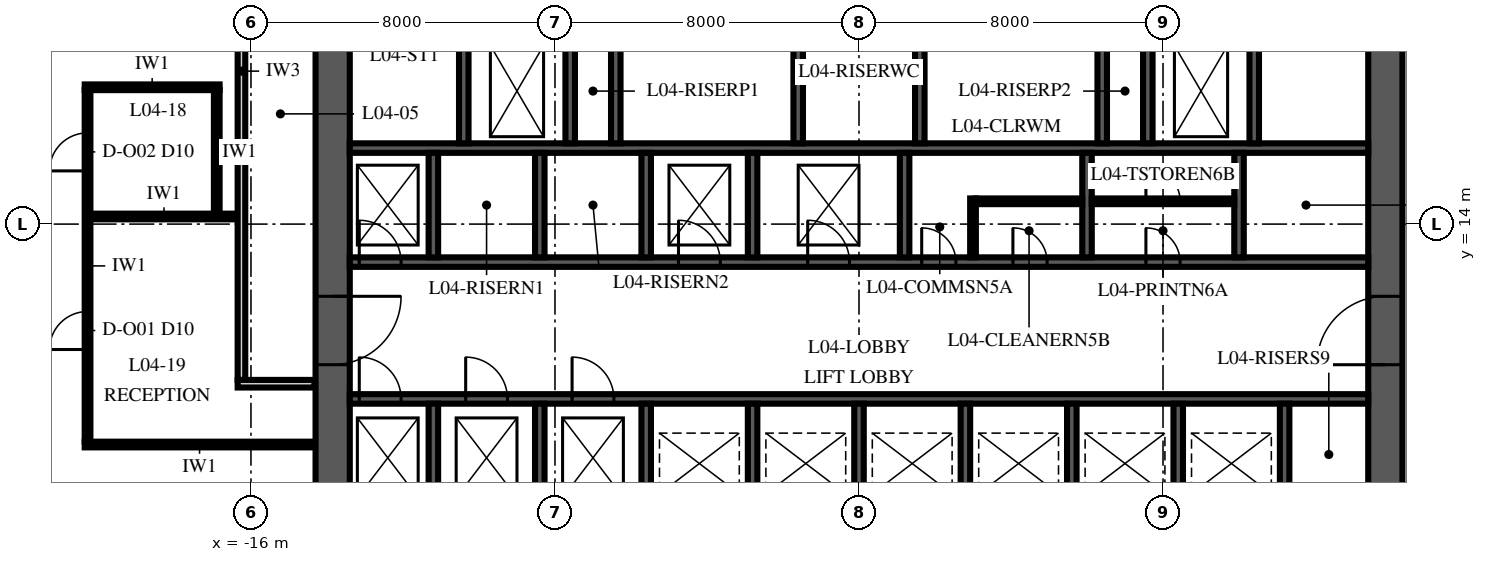
"""IFC4 building model, lengths in metres.
Left out: names, types, materials, properties, quantities, classifications, styles, units other than length and angle.
Written with IfcOpenShell. Run it as: python <this file> out.ifc"""

import sys

from ifc_helpers import new_model, si_unit, direction, frame, frame_2d, origin, place, context, subcontext, project, spatial, polyline, rectangle, outline, extrude, element, fill, save


model = new_model("IFC4")
c1 = context("Model", 3, precision=1e-05, world=origin(), true_north=direction((0.0, 1.0)))
c2 = subcontext(c1, "Body", "Model", "MODEL_VIEW")
j1 = project(units=[si_unit("LENGTHUNIT", "METRE"), si_unit("PLANEANGLEUNIT", "RADIAN")], contexts=[c1])
p1 = place(None, origin())
s1 = spatial("IfcSite", under=j1, at=p1, CompositionType="ELEMENT")
p2 = place(p1, origin())
s2 = spatial("IfcBuilding", under=s1, at=p2, CompositionType="ELEMENT")
p3 = place(p2, frame((0.0, 0.0, 28.0)))
s3 = spatial("IfcBuildingStorey", under=s2, at=p3, CompositionType="ELEMENT", Elevation=28.0)
p4 = place(p3, frame((13.85, 6.15, 0.0), z_axis=(0.0, 0.0, 1.0), x_axis=(0.0, 1.0, 0.0)))
e1 = element("IfcWall", 1, at=p4, inside=s3, PredefinedType="SHEAR", context=c2, shape_type="SweptSolid", body=[
    extrude(outline(polyline([(0.0, -0.45), (17.7, -0.45), (17.7, 0.0), (17.25, 0.0), (17.25, 0.45), (0.45, 0.45), (0.45, 0.0), (0.0, 0.0), (0.0, -0.45)])), origin(), (0.0, 0.0, 1.0), 4.0),
])
p5 = place(p4, frame((4.15, 0.0, 0.0)))
e2 = element("IfcOpeningElement", 2, at=p5, cuts=e1, PredefinedType="OPENING", context=c2, shape_type="SweptSolid", body=[
    extrude(rectangle(XDim=1.8, YDim=2.4, at=frame_2d((0.9, 1.2))), frame((0.0, 0.465, 0.0), z_axis=(0.0, -1.0, 0.0), x_axis=(1.0, 0.0, 0.0)), (0.0, 0.0, 1.0), 0.93),
])
p6 = place(p3, frame((-13.85, 23.85, 0.0), z_axis=(0.0, 0.0, 1.0), x_axis=(0.0, -1.0, 0.0)))
e3 = element("IfcWall", 3, at=p6, inside=s3, PredefinedType="SHEAR", context=c2, shape_type="SweptSolid", body=[
    extrude(outline(polyline([(0.0, -0.45), (17.7, -0.45), (17.7, 0.0), (17.25, 0.0), (17.25, 0.45), (0.45, 0.45), (0.45, 0.0), (0.0, 0.0), (0.0, -0.45)])), origin(), (0.0, 0.0, 1.0), 4.0),
])
p7 = place(p6, frame((11.75, 0.0, 0.0)))
e4 = element("IfcOpeningElement", 4, at=p7, cuts=e3, PredefinedType="OPENING", context=c2, shape_type="SweptSolid", body=[
    extrude(rectangle(XDim=1.8, YDim=2.4, at=frame_2d((0.9, 1.2))), frame((0.0, 0.465, 0.0), z_axis=(0.0, -1.0, 0.0), x_axis=(1.0, 0.0, 0.0)), (0.0, 0.0, 1.0), 0.93),
])
p8 = place(p3, frame((-13.4, 9.4, 0.0), z_axis=(0.0, 0.0, 1.0), x_axis=(1.0, 0.0, 0.0)))
e5 = element("IfcWall", 5, at=p8, inside=s3, PredefinedType="SHEAR", context=c2, shape_type="SweptSolid", body=[
    extrude(rectangle(XDim=26.8, YDim=0.25, at=frame_2d((13.4, 0.0))), origin(), (0.0, 0.0, 1.0), 4.0),
])
p9 = place(p8, frame((0.25, 0.0, 0.0)))
e6 = element("IfcOpeningElement", 6, at=p9, cuts=e5, PredefinedType="OPENING", context=c2, shape_type="SweptSolid", body=[
    extrude(rectangle(XDim=1.1, YDim=2.1, at=frame_2d((0.55, 1.05))), frame((0.0, 0.14, 0.0), z_axis=(0.0, -1.0, 0.0), x_axis=(1.0, 0.0, 0.0)), (0.0, 0.0, 1.0), 0.28),
])
p10 = place(p8, frame((3.05, 0.0, 0.0)))
e7 = element("IfcOpeningElement", 7, at=p10, cuts=e5, PredefinedType="OPENING", context=c2, shape_type="SweptSolid", body=[
    extrude(rectangle(XDim=1.1, YDim=2.1, at=frame_2d((0.55, 1.05))), frame((0.0, 0.14, 0.0), z_axis=(0.0, -1.0, 0.0), x_axis=(1.0, 0.0, 0.0)), (0.0, 0.0, 1.0), 0.28),
])
p11 = place(p8, frame((5.85, 0.0, 0.0)))
e8 = element("IfcOpeningElement", 8, at=p11, cuts=e5, PredefinedType="OPENING", context=c2, shape_type="SweptSolid", body=[
    extrude(rectangle(XDim=1.1, YDim=2.1, at=frame_2d((0.55, 1.05))), frame((0.0, 0.14, 0.0), z_axis=(0.0, -1.0, 0.0), x_axis=(1.0, 0.0, 0.0)), (0.0, 0.0, 1.0), 0.28),
])
p12 = place(p3, frame((-13.4, 13.0, 0.0), z_axis=(0.0, 0.0, 1.0), x_axis=(1.0, 0.0, 0.0)))
e9 = element("IfcWall", 9, at=p12, inside=s3, PredefinedType="SHEAR", context=c2, shape_type="SweptSolid", body=[
    extrude(rectangle(XDim=26.8, YDim=0.25, at=frame_2d((13.4, 0.0))), origin(), (0.0, 0.0, 1.0), 4.0),
])
p13 = place(p12, frame((0.25, 0.0, 0.0)))
e10 = element("IfcOpeningElement", 10, at=p13, cuts=e9, PredefinedType="OPENING", context=c2, shape_type="SweptSolid", body=[
    extrude(rectangle(XDim=1.1, YDim=2.1, at=frame_2d((0.55, 1.05))), frame((0.0, 0.14, 0.0), z_axis=(0.0, -1.0, 0.0), x_axis=(1.0, 0.0, 0.0)), (0.0, 0.0, 1.0), 0.28),
])
p14 = place(p12, frame((8.65, 0.0, 0.0)))
e11 = element("IfcOpeningElement", 11, at=p14, cuts=e9, PredefinedType="OPENING", context=c2, shape_type="SweptSolid", body=[
    extrude(rectangle(XDim=1.1, YDim=2.1, at=frame_2d((0.55, 1.05))), frame((0.0, 0.14, 0.0), z_axis=(0.0, -1.0, 0.0), x_axis=(1.0, 0.0, 0.0)), (0.0, 0.0, 1.0), 0.28),
])
p15 = place(p12, frame((12.05, 0.0, 0.0)))
e12 = element("IfcOpeningElement", 12, at=p15, cuts=e9, PredefinedType="OPENING", context=c2, shape_type="SweptSolid", body=[
    extrude(rectangle(XDim=1.1, YDim=2.1, at=frame_2d((0.55, 1.05))), frame((0.0, 0.14, 0.0), z_axis=(0.0, -1.0, 0.0), x_axis=(1.0, 0.0, 0.0)), (0.0, 0.0, 1.0), 0.28),
])
p16 = place(p12, frame((15.05, 0.0, 0.0)))
e13 = element("IfcOpeningElement", 13, at=p16, cuts=e9, PredefinedType="OPENING", context=c2, shape_type="SweptSolid", body=[
    extrude(rectangle(XDim=0.9, YDim=2.1, at=frame_2d((0.45, 1.05))), frame((0.0, 0.14, 0.0), z_axis=(0.0, -1.0, 0.0), x_axis=(1.0, 0.0, 0.0)), (0.0, 0.0, 1.0), 0.28),
])
p17 = place(p12, frame((17.45, 0.0, 0.0)))
e14 = element("IfcOpeningElement", 14, at=p17, cuts=e9, PredefinedType="OPENING", context=c2, shape_type="SweptSolid", body=[
    extrude(rectangle(XDim=0.9, YDim=2.1, at=frame_2d((0.45, 1.05))), frame((0.0, 0.14, 0.0), z_axis=(0.0, -1.0, 0.0), x_axis=(1.0, 0.0, 0.0)), (0.0, 0.0, 1.0), 0.28),
])
p18 = place(p12, frame((20.95, 0.0, 0.0)))
e15 = element("IfcOpeningElement", 15, at=p18, cuts=e9, PredefinedType="OPENING", context=c2, shape_type="SweptSolid", body=[
    extrude(rectangle(XDim=0.9, YDim=2.1, at=frame_2d((0.45, 1.05))), frame((0.0, 0.14, 0.0), z_axis=(0.0, -1.0, 0.0), x_axis=(1.0, 0.0, 0.0)), (0.0, 0.0, 1.0), 0.28),
])
p19 = place(p3, frame((-13.4, 16.0, 0.0), z_axis=(0.0, 0.0, 1.0), x_axis=(1.0, 0.0, 0.0)))
e16 = element("IfcWall", 16, at=p19, inside=s3, PredefinedType="SHEAR", context=c2, shape_type="SweptSolid", body=[
    extrude(rectangle(XDim=26.8, YDim=0.25, at=frame_2d((13.4, 0.0))), origin(), (0.0, 0.0, 1.0), 4.0),
])
for number, where, z_axis, x_axis in (
    (17, (-11.2, 6.6, 0.0), (0.0, 0.0, 1.0), (0.0, 1.0, 0.0)),
    (18, (-8.4, 6.6, 0.0), (0.0, 0.0, 1.0), (0.0, 1.0, 0.0)),
    (19, (-5.6, 6.6, 0.0), (0.0, 0.0, 1.0), (0.0, 1.0, 0.0)),
    (20, (-2.8, 6.6, 0.0), (0.0, 0.0, 1.0), (0.0, 1.0, 0.0)),
    (21, (0.0, 6.6, 0.0), (0.0, 0.0, 1.0), (0.0, 1.0, 0.0)),
    (22, (2.8, 6.6, 0.0), (0.0, 0.0, 1.0), (0.0, 1.0, 0.0)),
    (23, (5.6, 6.6, 0.0), (0.0, 0.0, 1.0), (0.0, 1.0, 0.0)),
    (24, (8.4, 6.6, 0.0), (0.0, 0.0, 1.0), (0.0, 1.0, 0.0)),
    (25, (11.2, 6.6, 0.0), (0.0, 0.0, 1.0), (0.0, 1.0, 0.0)),
):
    element("IfcWall", number, at=place(p3, frame(where, z_axis=z_axis, x_axis=x_axis)), inside=s3, PredefinedType="SHEAR", context=c2, shape_type="SweptSolid", body=[
        extrude(rectangle(XDim=2.675, YDim=0.25, at=frame_2d((1.337, 0.0))), origin(), (0.0, 0.0, 1.0), 4.0),
    ])
for number, where, z_axis, x_axis in (
    (26, (-11.2, 13.125, 0.0), (0.0, 0.0, 1.0), (0.0, 1.0, 0.0)),
    (27, (-8.4, 13.125, 0.0), (0.0, 0.0, 1.0), (0.0, 1.0, 0.0)),
    (28, (-5.6, 13.125, 0.0), (0.0, 0.0, 1.0), (0.0, 1.0, 0.0)),
    (29, (-2.8, 13.125, 0.0), (0.0, 0.0, 1.0), (0.0, 1.0, 0.0)),
    (30, (1.2, 13.125, 0.0), (0.0, 0.0, 1.0), (0.0, 1.0, 0.0)),
    (31, (6.0, 13.125, 0.0), (0.0, 0.0, 1.0), (0.0, 1.0, 0.0)),
    (32, (10.0, 13.125, 0.0), (0.0, 0.0, 1.0), (0.0, 1.0, 0.0)),
):
    element("IfcWall", number, at=place(p3, frame(where, z_axis=z_axis, x_axis=x_axis)), inside=s3, PredefinedType="SHEAR", context=c2, shape_type="SweptSolid", body=[
        extrude(rectangle(XDim=2.75, YDim=0.25, at=frame_2d((1.375, 0.0))), origin(), (0.0, 0.0, 1.0), 4.0),
    ])
p20 = place(p3, frame((-10.4, 16.125, 0.0), z_axis=(0.0, 0.0, 1.0), x_axis=(0.0, 1.0, 0.0)))
e33 = element("IfcWall", 33, at=p20, inside=s3, PredefinedType="SHEAR", context=c2, shape_type="SweptSolid", body=[
    extrude(rectangle(XDim=7.275, YDim=0.25, at=frame_2d((3.637, 0.0))), origin(), (0.0, 0.0, 1.0), 4.0),
])
p21 = place(p20, frame((6.075, 0.0, 0.0)))
e34 = element("IfcOpeningElement", 34, at=p21, cuts=e33, PredefinedType="OPENING", context=c2, shape_type="SweptSolid", body=[
    extrude(rectangle(XDim=1.0, YDim=2.1, at=frame_2d((0.5, 1.05))), frame((0.0, 0.14, 0.0), z_axis=(0.0, -1.0, 0.0), x_axis=(1.0, 0.0, 0.0)), (0.0, 0.0, 1.0), 0.28),
])
for number, where, z_axis, x_axis in (
    (35, (-6.4, 16.125, 0.0), (0.0, 0.0, 1.0), (0.0, 1.0, 0.0)),
    (36, (-1.6, 16.125, 0.0), (0.0, 0.0, 1.0), (0.0, 1.0, 0.0)),
    (37, (1.6, 16.125, 0.0), (0.0, 0.0, 1.0), (0.0, 1.0, 0.0)),
    (38, (6.4, 16.125, 0.0), (0.0, 0.0, 1.0), (0.0, 1.0, 0.0)),
):
    element("IfcWall", number, at=place(p3, frame(where, z_axis=z_axis, x_axis=x_axis)), inside=s3, PredefinedType="SHEAR", context=c2, shape_type="SweptSolid", body=[
        extrude(rectangle(XDim=7.275, YDim=0.25, at=frame_2d((3.637, 0.0))), origin(), (0.0, 0.0, 1.0), 4.0),
    ])
p22 = place(p3, frame((10.4, 16.125, 0.0), z_axis=(0.0, 0.0, 1.0), x_axis=(0.0, 1.0, 0.0)))
e39 = element("IfcWall", 39, at=p22, inside=s3, PredefinedType="SHEAR", context=c2, shape_type="SweptSolid", body=[
    extrude(rectangle(XDim=7.275, YDim=0.25, at=frame_2d((3.637, 0.0))), origin(), (0.0, 0.0, 1.0), 4.0),
])
p23 = place(p22, frame((6.075, 0.0, 0.0)))
e40 = element("IfcOpeningElement", 40, at=p23, cuts=e39, PredefinedType="OPENING", context=c2, shape_type="SweptSolid", body=[
    extrude(rectangle(XDim=1.0, YDim=2.1, at=frame_2d((0.5, 1.05))), frame((0.0, 0.14, 0.0), z_axis=(0.0, -1.0, 0.0), x_axis=(1.0, 0.0, 0.0)), (0.0, 0.0, 1.0), 0.28),
])
for number, where, z_axis, x_axis in (
    (41, (-7.6, 16.125, 0.0), (0.0, 0.0, 1.0), (0.0, 1.0, 0.0)),
    (42, (7.6, 16.125, 0.0), (0.0, 0.0, 1.0), (0.0, 1.0, 0.0)),
):
    element("IfcWall", number, at=place(p3, frame(where, z_axis=z_axis, x_axis=x_axis)), inside=s3, PredefinedType="SHEAR", context=c2, shape_type="SweptSolid", body=[
        extrude(rectangle(XDim=2.75, YDim=0.25, at=frame_2d((1.375, 0.0))), origin(), (0.0, 0.0, 1.0), 4.0),
    ])
p24 = place(p3, frame((3.0, 13.125, 0.0), z_axis=(0.0, 0.0, 1.0), x_axis=(0.0, 1.0, 0.0)))
e43 = element("IfcWall", 43, at=p24, inside=s3, PredefinedType="PARTITIONING", context=c2, shape_type="SweptSolid", body=[
    extrude(rectangle(XDim=1.55, YDim=0.15, at=frame_2d((0.775, 0.0))), origin(), (0.0, 0.0, 1.0), 3.85),
])
p25 = place(p3, frame((3.075, 14.6, 0.0), z_axis=(0.0, 0.0, 1.0), x_axis=(1.0, 0.0, 0.0)))
e44 = element("IfcWall", 44, at=p25, inside=s3, PredefinedType="PARTITIONING", context=c2, shape_type="SweptSolid", body=[
    extrude(rectangle(XDim=2.8, YDim=0.15, at=frame_2d((1.4, 0.0))), origin(), (0.0, 0.0, 1.0), 3.85),
])
p26 = place(p3, frame((6.125, 14.6, 0.0), z_axis=(0.0, 0.0, 1.0), x_axis=(1.0, 0.0, 0.0)))
e45 = element("IfcWall", 45, at=p26, inside=s3, PredefinedType="PARTITIONING", context=c2, shape_type="SweptSolid", body=[
    extrude(rectangle(XDim=3.75, YDim=0.15, at=frame_2d((1.875, 0.0))), origin(), (0.0, 0.0, 1.0), 3.85),
])
p27 = place(p26, frame((1.425, 0.0, 0.0)))
e46 = element("IfcOpeningElement", 46, at=p27, cuts=e45, PredefinedType="OPENING", context=c2, shape_type="SweptSolid", body=[
    extrude(rectangle(XDim=0.9, YDim=2.1, at=frame_2d((0.45, 1.05))), frame((0.0, 0.09, 0.0), z_axis=(0.0, -1.0, 0.0), x_axis=(1.0, 0.0, 0.0)), (0.0, 0.0, 1.0), 0.18),
])
p28 = place(p3, frame((-20.375, 8.2, 0.0), z_axis=(0.0, 0.0, 1.0), x_axis=(1.0, 0.0, 0.0)))
e47 = element("IfcWall", 47, at=p28, inside=s3, PredefinedType="PARTITIONING", context=c2, shape_type="SweptSolid", body=[
    extrude(rectangle(XDim=6.045, YDim=0.15, at=frame_2d((3.022, 0.0))), origin(), (0.0, 0.0, 1.0), 3.85),
])
p29 = place(p3, frame((-16.35, 9.8, 0.0), z_axis=(0.0, 0.0, 1.0), x_axis=(1.0, 0.0, 0.0)))
e48 = element("IfcWall", 48, at=p29, inside=s3, PredefinedType="PARTITIONING", context=c2, shape_type="SweptSolid", body=[
    extrude(rectangle(XDim=2.02, YDim=0.2, at=frame_2d((1.01, 0.0))), origin(), (0.0, 0.0, 1.0), 3.85),
])
p30 = place(p3, frame((-20.225, 14.2, 0.0), z_axis=(0.0, 0.0, 1.0), x_axis=(1.0, 0.0, 0.0)))
e49 = element("IfcWall", 49, at=p30, inside=s3, PredefinedType="PARTITIONING", context=c2, shape_type="SweptSolid", body=[
    extrude(rectangle(XDim=3.875, YDim=0.15, at=frame_2d((1.938, 0.0))), origin(), (0.0, 0.0, 1.0), 3.25),
])
p31 = place(p3, frame((-20.375, 17.6, 0.0), z_axis=(0.0, 0.0, 1.0), x_axis=(1.0, 0.0, 0.0)))
e50 = element("IfcWall", 50, at=p31, inside=s3, PredefinedType="PARTITIONING", context=c2, shape_type="SweptSolid", body=[
    extrude(rectangle(XDim=3.55, YDim=0.15, at=frame_2d((1.775, 0.0))), origin(), (0.0, 0.0, 1.0), 3.85),
])
p32 = place(p3, frame((-20.3, 8.275, 0.0), z_axis=(0.0, 0.0, 1.0), x_axis=(0.0, 1.0, 0.0)))
e51 = element("IfcWall", 51, at=p32, inside=s3, PredefinedType="PARTITIONING", context=c2, shape_type="SweptSolid", body=[
    extrude(rectangle(XDim=9.25, YDim=0.15, at=frame_2d((4.625, 0.0))), origin(), (0.0, 0.0, 1.0), 3.25),
])
p33 = place(p32, frame((2.425, 0.0, 0.0)))
e52 = element("IfcOpeningElement", 52, at=p33, cuts=e51, PredefinedType="OPENING", context=c2, shape_type="SweptSolid", body=[
    extrude(rectangle(XDim=1.0, YDim=2.3, at=frame_2d((0.5, 1.15))), frame((0.0, 0.09, 0.0), z_axis=(0.0, -1.0, 0.0), x_axis=(1.0, 0.0, 0.0)), (0.0, 0.0, 1.0), 0.18),
])
p34 = place(p32, frame((7.125, 0.0, 0.0)))
e53 = element("IfcOpeningElement", 53, at=p34, cuts=e51, PredefinedType="OPENING", context=c2, shape_type="SweptSolid", body=[
    extrude(rectangle(XDim=1.0, YDim=2.3, at=frame_2d((0.5, 1.15))), frame((0.0, 0.09, 0.0), z_axis=(0.0, -1.0, 0.0), x_axis=(1.0, 0.0, 0.0)), (0.0, 0.0, 1.0), 0.18),
])
p35 = place(p3, frame((-16.9, 14.275, 0.0), z_axis=(0.0, 0.0, 1.0), x_axis=(0.0, 1.0, 0.0)))
e54 = element("IfcWall", 54, at=p35, inside=s3, PredefinedType="PARTITIONING", context=c2, shape_type="SweptSolid", body=[
    extrude(rectangle(XDim=3.25, YDim=0.15, at=frame_2d((1.625, 0.0))), origin(), (0.0, 0.0, 1.0), 3.25),
])
p36 = place(p3, frame((-16.25, 9.9, 0.0), z_axis=(0.0, 0.0, 1.0), x_axis=(0.0, 1.0, 0.0)))
e55 = element("IfcWall", 55, at=p36, inside=s3, PredefinedType="PARTITIONING", context=c2, shape_type="SweptSolid", body=[
    extrude(rectangle(XDim=16.25, YDim=0.2, at=frame_2d((8.125, 0.0))), origin(), (0.0, 0.0, 1.0), 3.25),
])
p37 = place(p36, frame((14.75, 0.0, 0.0)))
e56 = element("IfcOpeningElement", 56, at=p37, cuts=e55, PredefinedType="OPENING", context=c2, shape_type="SweptSolid", body=[
    extrude(rectangle(XDim=1.2, YDim=2.4, at=frame_2d((0.6, 1.2))), frame((0.0, 0.115, 0.0), z_axis=(0.0, -1.0, 0.0), x_axis=(1.0, 0.0, 0.0)), (0.0, 0.0, 1.0), 0.23),
])
p38 = place(p5, origin())
e57 = element("IfcDoor", 57, at=p38, inside=s3, OperationType="DOUBLE_DOOR_SINGLE_SWING", PredefinedType="DOOR", context=c2, shape_type="SweptSolid", body=[
    extrude(rectangle(XDim=1.8, YDim=2.4, at=frame_2d((0.9, 1.2))), frame((0.0, 0.45, 0.0), z_axis=(0.0, -1.0, 0.0), x_axis=(1.0, 0.0, 0.0)), (0.0, 0.0, 1.0), 0.899),
])
fill(e2, e57)
p39 = place(p7, origin())
e58 = element("IfcDoor", 58, at=p39, inside=s3, OperationType="DOUBLE_DOOR_SINGLE_SWING", PredefinedType="DOOR", context=c2, shape_type="SweptSolid", body=[
    extrude(rectangle(XDim=1.8, YDim=2.4, at=frame_2d((0.9, 1.2))), frame((0.0, 0.45, 0.0), z_axis=(0.0, -1.0, 0.0), x_axis=(1.0, 0.0, 0.0)), (0.0, 0.0, 1.0), 0.899),
])
fill(e4, e58)
p40 = place(p9, origin())
e59 = element("IfcDoor", 59, at=p40, inside=s3, OperationType="SLIDING_TO_LEFT", PredefinedType="DOOR", context=c2, shape_type="SweptSolid", body=[
    extrude(rectangle(XDim=1.1, YDim=2.1, at=frame_2d((0.55, 1.05))), frame((0.0, 0.125, 0.0), z_axis=(0.0, -1.0, 0.0), x_axis=(1.0, 0.0, 0.0)), (0.0, 0.0, 1.0), 0.25),
])
fill(e6, e59)
p41 = place(p10, origin())
e60 = element("IfcDoor", 60, at=p41, inside=s3, OperationType="SLIDING_TO_LEFT", PredefinedType="DOOR", context=c2, shape_type="SweptSolid", body=[
    extrude(rectangle(XDim=1.1, YDim=2.1, at=frame_2d((0.55, 1.05))), frame((0.0, 0.125, 0.0), z_axis=(0.0, -1.0, 0.0), x_axis=(1.0, 0.0, 0.0)), (0.0, 0.0, 1.0), 0.25),
])
fill(e7, e60)
p42 = place(p11, origin())
e61 = element("IfcDoor", 61, at=p42, inside=s3, OperationType="SLIDING_TO_LEFT", PredefinedType="DOOR", context=c2, shape_type="SweptSolid", body=[
    extrude(rectangle(XDim=1.1, YDim=2.1, at=frame_2d((0.55, 1.05))), frame((0.0, 0.125, 0.0), z_axis=(0.0, -1.0, 0.0), x_axis=(1.0, 0.0, 0.0)), (0.0, 0.0, 1.0), 0.25),
])
fill(e8, e61)
p43 = place(p13, origin())
e62 = element("IfcDoor", 62, at=p43, inside=s3, OperationType="SLIDING_TO_LEFT", PredefinedType="DOOR", context=c2, shape_type="SweptSolid", body=[
    extrude(rectangle(XDim=1.1, YDim=2.1, at=frame_2d((0.55, 1.05))), frame((0.0, 0.125, 0.0), z_axis=(0.0, -1.0, 0.0), x_axis=(1.0, 0.0, 0.0)), (0.0, 0.0, 1.0), 0.25),
])
fill(e10, e62)
p44 = place(p14, origin())
e63 = element("IfcDoor", 63, at=p44, inside=s3, OperationType="SLIDING_TO_LEFT", PredefinedType="DOOR", context=c2, shape_type="SweptSolid", body=[
    extrude(rectangle(XDim=1.1, YDim=2.1, at=frame_2d((0.55, 1.05))), frame((0.0, 0.125, 0.0), z_axis=(0.0, -1.0, 0.0), x_axis=(1.0, 0.0, 0.0)), (0.0, 0.0, 1.0), 0.25),
])
fill(e11, e63)
p45 = place(p15, origin())
e64 = element("IfcDoor", 64, at=p45, inside=s3, OperationType="SLIDING_TO_LEFT", PredefinedType="DOOR", context=c2, shape_type="SweptSolid", body=[
    extrude(rectangle(XDim=1.1, YDim=2.1, at=frame_2d((0.55, 1.05))), frame((0.0, 0.125, 0.0), z_axis=(0.0, -1.0, 0.0), x_axis=(1.0, 0.0, 0.0)), (0.0, 0.0, 1.0), 0.25),
])
fill(e12, e64)
p46 = place(p16, origin())
e65 = element("IfcDoor", 65, at=p46, inside=s3, OperationType="SINGLE_SWING_LEFT", PredefinedType="DOOR", context=c2, shape_type="SweptSolid", body=[
    extrude(rectangle(XDim=0.9, YDim=2.1, at=frame_2d((0.45, 1.05))), frame((0.0, 0.125, 0.0), z_axis=(0.0, -1.0, 0.0), x_axis=(1.0, 0.0, 0.0)), (0.0, 0.0, 1.0), 0.25),
])
fill(e13, e65)
p47 = place(p17, origin())
e66 = element("IfcDoor", 66, at=p47, inside=s3, OperationType="SINGLE_SWING_LEFT", PredefinedType="DOOR", context=c2, shape_type="SweptSolid", body=[
    extrude(rectangle(XDim=0.9, YDim=2.1, at=frame_2d((0.45, 1.05))), frame((0.0, 0.125, 0.0), z_axis=(0.0, -1.0, 0.0), x_axis=(1.0, 0.0, 0.0)), (0.0, 0.0, 1.0), 0.25),
])
fill(e14, e66)
p48 = place(p18, origin())
e67 = element("IfcDoor", 67, at=p48, inside=s3, OperationType="SINGLE_SWING_LEFT", PredefinedType="DOOR", context=c2, shape_type="SweptSolid", body=[
    extrude(rectangle(XDim=0.9, YDim=2.1, at=frame_2d((0.45, 1.05))), frame((0.0, 0.125, 0.0), z_axis=(0.0, -1.0, 0.0), x_axis=(1.0, 0.0, 0.0)), (0.0, 0.0, 1.0), 0.25),
])
fill(e15, e67)
p49 = place(p27, origin())
e68 = element("IfcDoor", 68, at=p49, inside=s3, OperationType="SINGLE_SWING_LEFT", PredefinedType="DOOR", context=c2, shape_type="SweptSolid", body=[
    extrude(rectangle(XDim=0.9, YDim=2.1, at=frame_2d((0.45, 1.05))), frame((0.0, 0.075, 0.0), z_axis=(0.0, -1.0, 0.0), x_axis=(1.0, 0.0, 0.0)), (0.0, 0.0, 1.0), 0.149),
])
fill(e46, e68)
p50 = place(p33, origin())
e69 = element("IfcDoor", 69, at=p50, inside=s3, OperationType="SINGLE_SWING_LEFT", PredefinedType="DOOR", context=c2, shape_type="SweptSolid", body=[
    extrude(rectangle(XDim=1.0, YDim=2.3, at=frame_2d((0.5, 1.15))), frame((0.0, 0.075, 0.0), z_axis=(0.0, -1.0, 0.0), x_axis=(1.0, 0.0, 0.0)), (0.0, 0.0, 1.0), 0.149),
])
fill(e52, e69)
p51 = place(p34, origin())
e70 = element("IfcDoor", 70, at=p51, inside=s3, OperationType="SINGLE_SWING_LEFT", PredefinedType="DOOR", context=c2, shape_type="SweptSolid", body=[
    extrude(rectangle(XDim=1.0, YDim=2.3, at=frame_2d((0.5, 1.15))), frame((0.0, 0.075, 0.0), z_axis=(0.0, -1.0, 0.0), x_axis=(1.0, 0.0, 0.0)), (0.0, 0.0, 1.0), 0.149),
])
fill(e53, e70)
save(model, sys.argv[1])
